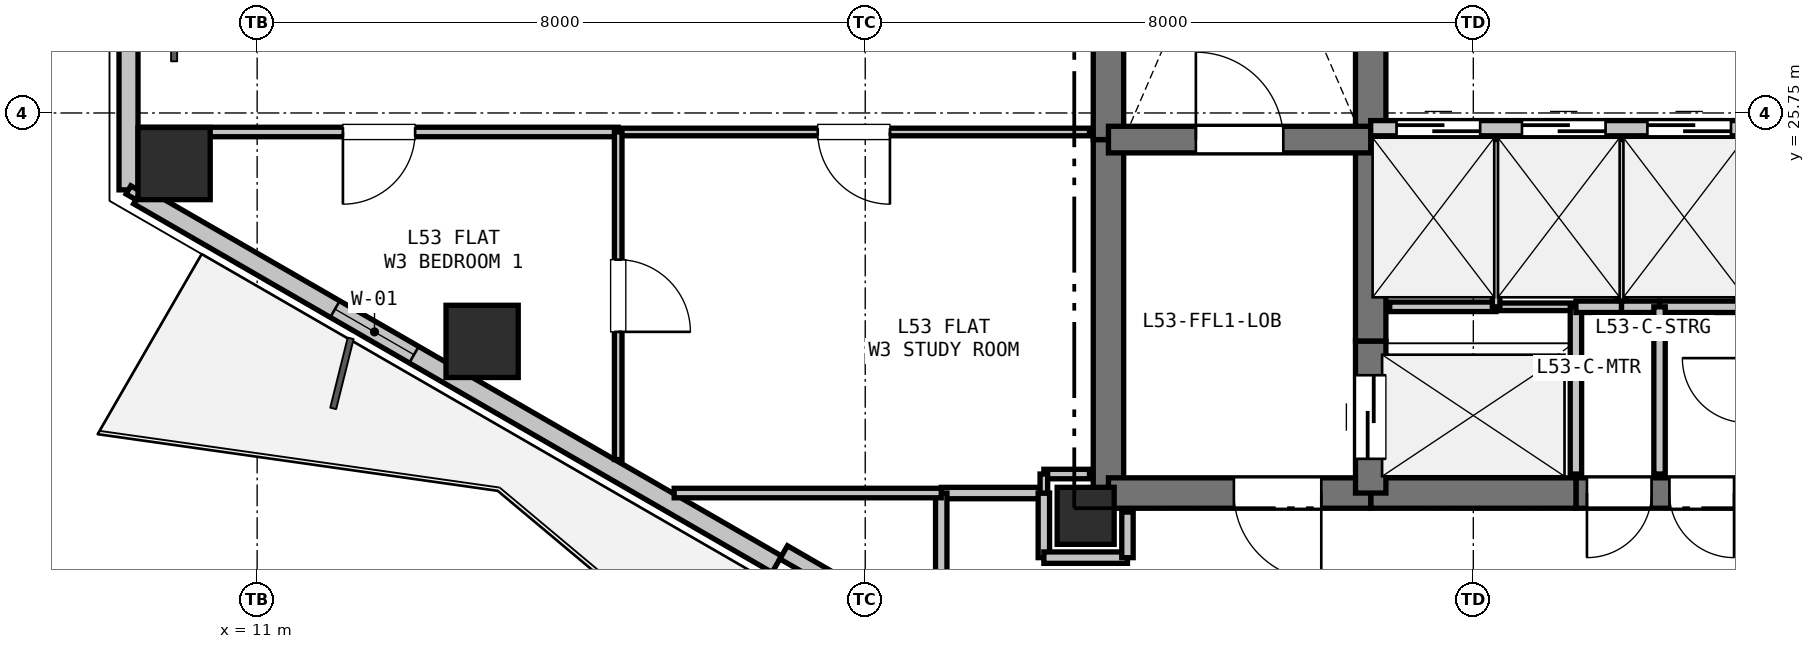
"""IFC4 building model, lengths in metres.
Left out: names, types, materials, properties, quantities, classifications, styles, units other than length and angle.
Written with IfcOpenShell. Run it as: python <this file> out.ifc"""

import sys

from ifc_helpers import new_model, si_unit, direction, frame, frame_2d, origin, origin_2d, place, context, subcontext, project, spatial, rectangle, hollow_rectangle, extrude, element, fill, save


model = new_model("IFC4")
c1 = context("Model", 3, precision=1e-05, world=origin(), true_north=direction((0.0, 1.0)))
c2 = subcontext(c1, "Body", "Model", "MODEL_VIEW")
j1 = project(units=[si_unit("LENGTHUNIT", "METRE"), si_unit("PLANEANGLEUNIT", "RADIAN")], contexts=[c1])
p1 = place(None, origin())
s1 = spatial("IfcSite", under=j1, at=p1, CompositionType="ELEMENT")
p2 = place(p1, origin())
s2 = spatial("IfcBuilding", under=s1, at=p2, CompositionType="ELEMENT")
p3 = place(p2, frame((0.0, 0.0, 192.0)))
s3 = spatial("IfcBuildingStorey", under=s2, at=p3, CompositionType="ELEMENT", Elevation=192.0)
p4 = place(p3, frame((21.9, 20.45, 0.0), z_axis=(0.0, 0.0, 1.0), x_axis=(1.0, 0.0, 0.0)))
e1 = element("IfcColumn", 1, at=p4, inside=s3, PredefinedType="COLUMN", context=c2, shape_type="SweptSolid", body=[
    extrude(rectangle(XDim=0.75, YDim=0.75, at=origin_2d()), origin(), (0.0, 0.0, 1.0), 3.3),
])
for number, where, z_axis, x_axis in (
    (2, (13.96, 22.745, 0.0), (0.0, 0.0, 1.0), (1.0, 0.0, 0.0)),
    (3, (9.907, 25.085, 0.0), (0.0, 0.0, 1.0), (1.0, 0.0, 0.0)),
):
    element("IfcColumn", number, at=place(p3, frame(where, z_axis=z_axis, x_axis=x_axis)), inside=s3, PredefinedType="COLUMN", context=c2, shape_type="SweptSolid", body=[
        extrude(hollow_rectangle(XDim=0.95, YDim=0.95, WallThickness=0.028, at=origin_2d()), origin(), (0.0, 0.0, 1.0), 3.3),
    ])
p5 = place(p3, frame((9.308, 24.738, 0.0), z_axis=(0.0, 0.0, 1.0), x_axis=(0.0, 1.0, 0.0)))
e4 = element("IfcWall", 4, at=p5, inside=s3, PredefinedType="SOLIDWALL", context=c2, shape_type="SweptSolid", body=[
    extrude(rectangle(XDim=4.023, YDim=0.25, at=frame_2d((2.012, 0.0))), origin(), (0.0, 0.0, 1.0), 2.69),
])
p6 = place(p3, frame((17.837, 19.814, 0.0), z_axis=(0.0, 0.0, 1.0), x_axis=(-0.866027133173, 0.499997004599, 0.0)))
e5 = element("IfcWall", 5, at=p6, inside=s3, PredefinedType="SOLIDWALL", context=c2, shape_type="SweptSolid", body=[
    extrude(rectangle(XDim=9.699, YDim=0.25, at=frame_2d((4.849, 0.0))), origin(), (0.0, 0.0, 1.0), 2.69),
])
p7 = place(p6, frame((5.512, 0.0, 0.9)))
e6 = element("IfcOpeningElement", 6, at=p7, cuts=e5, PredefinedType="OPENING", context=c2, shape_type="SweptSolid", body=[
    extrude(rectangle(XDim=1.2, YDim=1.4, at=frame_2d((0.6, 0.7))), frame((0.0, 0.135, 0.0), z_axis=(0.0, -1.0, 0.0), x_axis=(1.0, 0.0, 0.0)), (0.0, 0.0, 1.0), 0.27),
])
p8 = place(p3, frame((19.399, 19.12, 0.0), z_axis=(0.0, 0.0, 1.0), x_axis=(-0.86605165483, 0.499954529098, 0.0)))
e7 = element("IfcWall", 7, at=p8, inside=s3, PredefinedType="PARAPET", context=c2, shape_type="SweptSolid", body=[
    extrude(rectangle(XDim=1.7, YDim=0.2, at=frame_2d((0.85, 0.0))), origin(), (0.0, 0.0, 1.0), 2.69),
])
p9 = place(p3, frame((22.2, 20.75, 0.0), z_axis=(0.0, 0.0, 1.0), x_axis=(0.0, 1.0, 0.0)))
e8 = element("IfcWall", 8, at=p9, inside=s3, PredefinedType="SHEAR", context=c2, shape_type="SweptSolid", body=[
    extrude(rectangle(XDim=4.65, YDim=0.4, at=frame_2d((2.325, 0.0))), origin(), (0.0, 0.0, 1.0), 3.07),
])
p10 = place(p3, frame((22.2, 25.4, 0.0), z_axis=(0.0, 0.0, 1.0), x_axis=(0.0, 1.0, 0.0)))
e9 = element("IfcWall", 9, at=p10, inside=s3, PredefinedType="SHEAR", context=c2, shape_type="SweptSolid", body=[
    extrude(rectangle(XDim=7.35, YDim=0.4, at=frame_2d((3.675, 0.0))), origin(), (0.0, 0.0, 1.0), 3.07),
])
p11 = place(p3, frame((30.6, 20.75, 0.0), z_axis=(0.0, 0.0, 1.0), x_axis=(-1.0, 0.0, 0.0)))
e10 = element("IfcWall", 10, at=p11, inside=s3, PredefinedType="SHEAR", context=c2, shape_type="SweptSolid", body=[
    extrude(rectangle(XDim=2.25, YDim=0.4, at=frame_2d((1.125, 0.0))), origin(), (0.0, 0.0, 1.0), 3.07),
])
p12 = place(p11, frame((1.255, 0.0, 0.0)))
e11 = element("IfcOpeningElement", 11, at=p12, cuts=e10, PredefinedType="OPENING", context=c2, shape_type="SweptSolid", body=[
    extrude(rectangle(XDim=0.85, YDim=2.1, at=frame_2d((0.425, 1.05))), frame((0.0, 0.21, 0.0), z_axis=(0.0, -1.0, 0.0), x_axis=(1.0, 0.0, 0.0)), (0.0, 0.0, 1.0), 0.42),
])
p13 = place(p11, frame((0.17, 0.0, 0.0)))
e12 = element("IfcOpeningElement", 12, at=p13, cuts=e10, PredefinedType="OPENING", context=c2, shape_type="SweptSolid", body=[
    extrude(rectangle(XDim=0.85, YDim=2.1, at=frame_2d((0.425, 1.05))), frame((0.0, 0.21, 0.0), z_axis=(0.0, -1.0, 0.0), x_axis=(1.0, 0.0, 0.0)), (0.0, 0.0, 1.0), 0.42),
])
p14 = place(p3, frame((28.35, 20.75, 0.0), z_axis=(0.0, 0.0, 1.0), x_axis=(-1.0, 0.0, 0.0)))
e13 = element("IfcWall", 13, at=p14, inside=s3, PredefinedType="SHEAR", context=c2, shape_type="SweptSolid", body=[
    extrude(rectangle(XDim=2.7, YDim=0.4, at=frame_2d((1.35, 0.0))), origin(), (0.0, 0.0, 1.0), 3.07),
])
p15 = place(p3, frame((25.65, 20.75, 0.0), z_axis=(0.0, 0.0, 1.0), x_axis=(-1.0, 0.0, 0.0)))
e14 = element("IfcWall", 14, at=p15, inside=s3, PredefinedType="SHEAR", context=c2, shape_type="SweptSolid", body=[
    extrude(rectangle(XDim=3.45, YDim=0.4, at=frame_2d((1.725, 0.0))), origin(), (0.0, 0.0, 1.0), 3.07),
])
p16 = place(p15, frame((0.65, 0.0, 0.0)))
e15 = element("IfcOpeningElement", 15, at=p16, cuts=e14, PredefinedType="OPENING", context=c2, shape_type="SweptSolid", body=[
    extrude(rectangle(XDim=1.15, YDim=2.15, at=frame_2d((0.575, 1.075))), frame((0.0, 0.21, 0.0), z_axis=(0.0, -1.0, 0.0), x_axis=(1.0, 0.0, 0.0)), (0.0, 0.0, 1.0), 0.42),
])
p17 = place(p3, frame((25.65, 20.75, 0.0), z_axis=(0.0, 0.0, 1.0), x_axis=(0.0, 1.0, 0.0)))
e16 = element("IfcWall", 16, at=p17, inside=s3, PredefinedType="SHEAR", context=c2, shape_type="SweptSolid", body=[
    extrude(rectangle(XDim=2.0, YDim=0.4, at=frame_2d((1.0, 0.0))), origin(), (0.0, 0.0, 1.0), 3.07),
])
p18 = place(p17, frame((0.45, 0.0, 0.0)))
e17 = element("IfcOpeningElement", 17, at=p18, cuts=e16, PredefinedType="OPENING", context=c2, shape_type="SweptSolid", body=[
    extrude(rectangle(XDim=1.1, YDim=2.15, at=frame_2d((0.55, 1.075))), frame((0.0, 0.21, 0.0), z_axis=(0.0, -1.0, 0.0), x_axis=(1.0, 0.0, 0.0)), (0.0, 0.0, 1.0), 0.42),
])
p19 = place(p3, frame((25.65, 22.75, 0.0), z_axis=(0.0, 0.0, 1.0), x_axis=(0.0, 1.0, 0.0)))
e18 = element("IfcWall", 18, at=p19, inside=s3, PredefinedType="SHEAR", context=c2, shape_type="SweptSolid", body=[
    extrude(rectangle(XDim=2.8, YDim=0.4, at=frame_2d((1.4, 0.0))), origin(), (0.0, 0.0, 1.0), 3.07),
])
p20 = place(p3, frame((25.65, 25.55, 0.0), z_axis=(0.0, 0.0, 1.0), x_axis=(0.0, 1.0, 0.0)))
e19 = element("IfcWall", 19, at=p20, inside=s3, PredefinedType="SHEAR", context=c2, shape_type="SweptSolid", body=[
    extrude(rectangle(XDim=2.4, YDim=0.4, at=frame_2d((1.2, 0.0))), origin(), (0.0, 0.0, 1.0), 3.07),
])
p21 = place(p3, frame((22.2, 25.4, 0.0), z_axis=(0.0, 0.0, 1.0), x_axis=(1.0, 0.0, 0.0)))
e20 = element("IfcWall", 20, at=p21, inside=s3, PredefinedType="SHEAR", context=c2, shape_type="SweptSolid", body=[
    extrude(rectangle(XDim=3.45, YDim=0.35, at=frame_2d((1.725, 0.0))), origin(), (0.0, 0.0, 1.0), 3.07),
])
p22 = place(p21, frame((1.15, 0.0, 0.0)))
e21 = element("IfcOpeningElement", 21, at=p22, cuts=e20, PredefinedType="OPENING", context=c2, shape_type="SweptSolid", body=[
    extrude(rectangle(XDim=1.15, YDim=2.15, at=frame_2d((0.575, 1.075))), frame((0.0, 0.185, 0.0), z_axis=(0.0, -1.0, 0.0), x_axis=(1.0, 0.0, 0.0)), (0.0, 0.0, 1.0), 0.37),
])
p23 = place(p3, frame((25.65, 25.55, 0.0), z_axis=(0.0, 0.0, 1.0), x_axis=(1.0, 0.0, 0.0)))
e22 = element("IfcWall", 22, at=p23, inside=s3, PredefinedType="PARTITIONING", context=c2, shape_type="SweptSolid", body=[
    extrude(rectangle(XDim=4.95, YDim=0.2, at=frame_2d((2.475, 0.0))), origin(), (0.0, 0.0, 1.0), 3.07),
])
p24 = place(p23, frame((0.34, 0.0, 0.0)))
e23 = element("IfcOpeningElement", 23, at=p24, cuts=e22, PredefinedType="OPENING", context=c2, shape_type="SweptSolid", body=[
    extrude(rectangle(XDim=1.1, YDim=2.15, at=frame_2d((0.55, 1.075))), frame((0.0, 0.11, 0.0), z_axis=(0.0, -1.0, 0.0), x_axis=(1.0, 0.0, 0.0)), (0.0, 0.0, 1.0), 0.22),
])
p25 = place(p23, frame((1.99, 0.0, 0.0)))
e24 = element("IfcOpeningElement", 24, at=p25, cuts=e22, PredefinedType="OPENING", context=c2, shape_type="SweptSolid", body=[
    extrude(rectangle(XDim=1.1, YDim=2.15, at=frame_2d((0.55, 1.075))), frame((0.0, 0.11, 0.0), z_axis=(0.0, -1.0, 0.0), x_axis=(1.0, 0.0, 0.0)), (0.0, 0.0, 1.0), 0.22),
])
p26 = place(p23, frame((3.64, 0.0, 0.0)))
e25 = element("IfcOpeningElement", 25, at=p26, cuts=e22, PredefinedType="OPENING", context=c2, shape_type="SweptSolid", body=[
    extrude(rectangle(XDim=1.1, YDim=2.15, at=frame_2d((0.55, 1.075))), frame((0.0, 0.11, 0.0), z_axis=(0.0, -1.0, 0.0), x_axis=(1.0, 0.0, 0.0)), (0.0, 0.0, 1.0), 0.22),
])
p27 = place(p3, frame((25.9, 23.2, 0.0), z_axis=(0.0, 0.0, 1.0), x_axis=(1.0, 0.0, 0.0)))
e26 = element("IfcWall", 26, at=p27, inside=s3, PredefinedType="PARTITIONING", context=c2, shape_type="SweptSolid", body=[
    extrude(rectangle(XDim=1.4, YDim=0.125, at=frame_2d((0.7, 0.0))), origin(), (0.0, 0.0, 1.0), 3.07),
])
p28 = place(p3, frame((27.3, 23.2, 0.0), z_axis=(0.0, 0.0, 1.0), x_axis=(1.0, 0.0, 0.0)))
e27 = element("IfcWall", 27, at=p28, inside=s3, PredefinedType="PARTITIONING", context=c2, shape_type="SweptSolid", body=[
    extrude(rectangle(XDim=1.05, YDim=0.1, at=frame_2d((0.525, 0.0))), origin(), (0.0, 0.0, 1.0), 3.07),
])
p29 = place(p3, frame((28.35, 23.2, 0.0), z_axis=(0.0, 0.0, 1.0), x_axis=(0.0, -1.0, 0.0)))
e28 = element("IfcWall", 28, at=p29, inside=s3, PredefinedType="PARTITIONING", context=c2, shape_type="SweptSolid", body=[
    extrude(rectangle(XDim=2.2, YDim=0.15, at=frame_2d((1.1, 0.0))), origin(), (0.0, 0.0, 1.0), 3.07),
])
p30 = place(p3, frame((27.3, 25.4, 0.0), z_axis=(0.0, 0.0, 1.0), x_axis=(0.0, -1.0, 0.0)))
e29 = element("IfcWall", 29, at=p30, inside=s3, PredefinedType="PARTITIONING", context=c2, shape_type="SweptSolid", body=[
    extrude(rectangle(XDim=2.2, YDim=0.1, at=frame_2d((1.1, 0.0))), origin(), (0.0, 0.0, 1.0), 3.07),
])
p31 = place(p3, frame((28.95, 25.4, 0.0), z_axis=(0.0, 0.0, 1.0), x_axis=(0.0, -1.0, 0.0)))
e30 = element("IfcWall", 30, at=p31, inside=s3, PredefinedType="PARTITIONING", context=c2, shape_type="SweptSolid", body=[
    extrude(rectangle(XDim=2.2, YDim=0.125, at=frame_2d((1.1, 0.0))), origin(), (0.0, 0.0, 1.0), 3.07),
])
p32 = place(p3, frame((28.95, 23.2, 0.0), z_axis=(0.0, 0.0, 1.0), x_axis=(-1.0, 0.0, 0.0)))
e31 = element("IfcWall", 31, at=p32, inside=s3, PredefinedType="PARTITIONING", context=c2, shape_type="SweptSolid", body=[
    extrude(rectangle(XDim=0.6, YDim=0.15, at=frame_2d((0.3, 0.0))), origin(), (0.0, 0.0, 1.0), 3.07),
])
p33 = place(p3, frame((30.6, 23.2, 0.0), z_axis=(0.0, 0.0, 1.0), x_axis=(-1.0, 0.0, 0.0)))
e32 = element("IfcWall", 32, at=p33, inside=s3, PredefinedType="PARTITIONING", context=c2, shape_type="SweptSolid", body=[
    extrude(rectangle(XDim=1.15, YDim=0.15, at=frame_2d((0.575, 0.0))), origin(), (0.0, 0.0, 1.0), 3.07),
])
p34 = place(p3, frame((29.45, 23.2, 0.0), z_axis=(0.0, 0.0, 1.0), x_axis=(-1.0, 0.0, 0.0)))
e33 = element("IfcWall", 33, at=p34, inside=s3, PredefinedType="PARTITIONING", context=c2, shape_type="SweptSolid", body=[
    extrude(rectangle(XDim=0.5, YDim=0.15, at=frame_2d((0.25, 0.0))), origin(), (0.0, 0.0, 1.0), 3.07),
])
p35 = place(p3, frame((20.0, 20.75, 0.0), z_axis=(0.0, 0.0, 1.0), x_axis=(1.0, 0.0, 0.0)))
e34 = element("IfcWall", 34, at=p35, inside=s3, PredefinedType="PARTITIONING", context=c2, shape_type="SweptSolid", body=[
    extrude(rectangle(XDim=1.35, YDim=0.15, at=frame_2d((0.675, 0.0))), origin(), (0.0, 0.0, 1.0), 2.518),
])
p36 = place(p3, frame((21.35, 20.75, 0.0), z_axis=(0.0, 0.0, 1.0), x_axis=(0.0, -1.0, 0.0)))
e35 = element("IfcWall", 35, at=p36, inside=s3, PredefinedType="PARTITIONING", context=c2, shape_type="SweptSolid", body=[
    extrude(rectangle(XDim=0.85, YDim=0.15, at=frame_2d((0.425, 0.0))), origin(), (0.0, 0.0, 1.0), 2.518),
])
p37 = place(p3, frame((21.35, 19.9, 0.0), z_axis=(0.0, 0.0, 1.0), x_axis=(1.0, 0.0, 0.0)))
e36 = element("IfcWall", 36, at=p37, inside=s3, PredefinedType="PARTITIONING", context=c2, shape_type="SweptSolid", body=[
    extrude(rectangle(XDim=1.1, YDim=0.15, at=frame_2d((0.55, 0.0))), origin(), (0.0, 0.0, 1.0), 2.518),
])
p38 = place(p3, frame((22.45, 19.9, 0.0), z_axis=(0.0, 0.0, 1.0), x_axis=(0.0, 1.0, 0.0)))
e37 = element("IfcWall", 37, at=p38, inside=s3, PredefinedType="PARTITIONING", context=c2, shape_type="SweptSolid", body=[
    extrude(rectangle(XDim=0.6, YDim=0.15, at=frame_2d((0.3, 0.0))), origin(), (0.0, 0.0, 1.0), 2.518),
])
p39 = place(p3, frame((20.0, 18.609, 0.0), z_axis=(0.0, 0.0, 1.0), x_axis=(0.0, 1.0, 0.0)))
e38 = element("IfcWall", 38, at=p39, inside=s3, PredefinedType="PARTITIONING", context=c2, shape_type="SweptSolid", body=[
    extrude(rectangle(XDim=2.141, YDim=0.15, at=frame_2d((1.071, 0.0))), origin(), (0.0, 0.0, 1.0), 2.365),
])
p40 = place(p3, frame((29.45, 23.2, 0.0), z_axis=(0.0, 0.0, 1.0), x_axis=(0.0, -1.0, 0.0)))
e39 = element("IfcWall", 39, at=p40, inside=s3, PredefinedType="PARTITIONING", context=c2, shape_type="SweptSolid", body=[
    extrude(rectangle(XDim=2.2, YDim=0.15, at=frame_2d((1.1, 0.0))), origin(), (0.0, 0.0, 1.0), 3.07),
])
p41 = place(p3, frame((21.95, 25.5, 0.0), z_axis=(0.0, 0.0, 1.0), x_axis=(-1.0, 0.0, 0.0)))
e40 = element("IfcWall", 40, at=p41, inside=s3, PredefinedType="PARTITIONING", context=c2, shape_type="SweptSolid", body=[
    extrude(rectangle(XDim=6.2, YDim=0.1, at=frame_2d((3.1, 0.0))), origin(), (0.0, 0.0, 1.0), 2.595),
])
p42 = place(p41, frame((2.625, 0.0, 0.0)))
e41 = element("IfcOpeningElement", 41, at=p42, cuts=e40, PredefinedType="OPENING", context=c2, shape_type="SweptSolid", body=[
    extrude(rectangle(XDim=0.95, YDim=2.1, at=frame_2d((0.475, 1.05))), frame((0.0, 0.06, 0.0), z_axis=(0.0, -1.0, 0.0), x_axis=(1.0, 0.0, 0.0)), (0.0, 0.0, 1.0), 0.12),
])
p43 = place(p3, frame((15.75, 25.5, 0.0), z_axis=(0.0, 0.0, 1.0), x_axis=(-1.0, 0.0, 0.0)))
e42 = element("IfcWall", 42, at=p43, inside=s3, PredefinedType="PARTITIONING", context=c2, shape_type="SweptSolid", body=[
    extrude(rectangle(XDim=6.293, YDim=0.125, at=frame_2d((3.147, 0.0))), origin(), (0.0, 0.0, 1.0), 2.795),
])
p44 = place(p43, frame((2.672, 0.0, 0.0)))
e43 = element("IfcOpeningElement", 43, at=p44, cuts=e42, PredefinedType="OPENING", context=c2, shape_type="SweptSolid", body=[
    extrude(rectangle(XDim=0.95, YDim=2.1, at=frame_2d((0.475, 1.05))), frame((0.0, 0.073, 0.0), z_axis=(0.0, -1.0, 0.0), x_axis=(1.0, 0.0, 0.0)), (0.0, 0.0, 1.0), 0.145),
])
p45 = place(p3, frame((9.437, 24.663, 0.0), z_axis=(0.0, 0.0, 1.0), x_axis=(-0.866239593359, 0.499628829129, 0.0)))
e44 = element("IfcWall", 44, at=p45, inside=s3, PredefinedType="PARTITIONING", context=c2, shape_type="SweptSolid", body=[
    extrude(rectangle(XDim=0.15, YDim=0.125, at=frame_2d((0.075, 0.0))), origin(), (0.0, 0.0, 1.0), 3.07),
])
p46 = place(p3, frame((15.75, 25.5, 0.0), z_axis=(0.0, 0.0, 1.0), x_axis=(0.0, -1.0, 0.0)))
e45 = element("IfcWall", 45, at=p46, inside=s3, PredefinedType="PARTITIONING", context=c2, shape_type="SweptSolid", body=[
    extrude(rectangle(XDim=4.309, YDim=0.1, at=frame_2d((2.155, 0.0))), origin(), (0.0, 0.0, 1.0), 2.365),
])
p47 = place(p46, frame((1.68, 0.0, 0.0)))
e46 = element("IfcOpeningElement", 46, at=p47, cuts=e45, PredefinedType="OPENING", context=c2, shape_type="SweptSolid", body=[
    extrude(rectangle(XDim=0.95, YDim=2.1, at=frame_2d((0.475, 1.05))), frame((0.0, 0.06, 0.0), z_axis=(0.0, -1.0, 0.0), x_axis=(1.0, 0.0, 0.0)), (0.0, 0.0, 1.0), 0.12),
])
p48 = place(p3, frame((21.95, 21.0, 0.0), z_axis=(0.0, 0.0, 1.0), x_axis=(-1.0, 0.0, 0.0)))
e47 = element("IfcWall", 47, at=p48, inside=s3, PredefinedType="PARTITIONING", context=c2, shape_type="SweptSolid", body=[
    extrude(rectangle(XDim=0.6, YDim=0.125, at=frame_2d((0.3, 0.0))), origin(), (0.0, 0.0, 1.0), 2.595),
])
p49 = place(p3, frame((21.35, 21.0, 0.0), z_axis=(0.0, 0.0, 1.0), x_axis=(0.0, -1.0, 0.0)))
e48 = element("IfcWall", 48, at=p49, inside=s3, PredefinedType="PARTITIONING", context=c2, shape_type="SweptSolid", body=[
    extrude(rectangle(XDim=0.25, YDim=0.1, at=frame_2d((0.125, 0.0))), origin(), (0.0, 0.0, 1.0), 2.518),
])
p50 = place(p3, frame((20.0, 20.75, 0.0), z_axis=(0.0, 0.0, 1.0), x_axis=(-1.0, 0.0, 0.0)))
e49 = element("IfcWall", 49, at=p50, inside=s3, PredefinedType="PARTITIONING", context=c2, shape_type="SweptSolid", body=[
    extrude(rectangle(XDim=3.514, YDim=0.125, at=frame_2d((1.757, 0.0))), origin(), (0.0, 0.0, 1.0), 2.365),
])
p51 = place(p7, origin())
e50 = element("IfcWindow", 50, at=p51, inside=s3, PartitioningType="SINGLE_PANEL", PredefinedType="WINDOW", context=c2, shape_type="SweptSolid", body=[
    extrude(rectangle(XDim=1.2, YDim=1.4, at=frame_2d((0.6, 0.7))), frame((0.0, 0.03, 0.0), z_axis=(0.0, -1.0, 0.0), x_axis=(1.0, 0.0, 0.0)), (0.0, 0.0, 1.0), 0.06),
])
fill(e6, e50)
p52 = place(p24, origin())
e51 = element("IfcDoor", 51, at=p52, inside=s3, OperationType="SLIDING_TO_LEFT", PredefinedType="DOOR", context=c2, shape_type="SweptSolid", body=[
    extrude(rectangle(XDim=1.1, YDim=2.15, at=frame_2d((0.55, 1.075))), frame((0.0, 0.025, 0.0), z_axis=(0.0, -1.0, 0.0), x_axis=(1.0, 0.0, 0.0)), (0.0, 0.0, 1.0), 0.05),
])
fill(e23, e51)
p53 = place(p25, origin())
e52 = element("IfcDoor", 52, at=p53, inside=s3, OperationType="SLIDING_TO_LEFT", PredefinedType="DOOR", context=c2, shape_type="SweptSolid", body=[
    extrude(rectangle(XDim=1.1, YDim=2.15, at=frame_2d((0.55, 1.075))), frame((0.0, 0.025, 0.0), z_axis=(0.0, -1.0, 0.0), x_axis=(1.0, 0.0, 0.0)), (0.0, 0.0, 1.0), 0.05),
])
fill(e24, e52)
p54 = place(p26, origin())
e53 = element("IfcDoor", 53, at=p54, inside=s3, OperationType="SLIDING_TO_LEFT", PredefinedType="DOOR", context=c2, shape_type="SweptSolid", body=[
    extrude(rectangle(XDim=1.1, YDim=2.15, at=frame_2d((0.55, 1.075))), frame((0.0, 0.025, 0.0), z_axis=(0.0, -1.0, 0.0), x_axis=(1.0, 0.0, 0.0)), (0.0, 0.0, 1.0), 0.05),
])
fill(e25, e53)
p55 = place(p18, origin())
e54 = element("IfcDoor", 54, at=p55, inside=s3, OperationType="SLIDING_TO_LEFT", PredefinedType="DOOR", context=c2, shape_type="SweptSolid", body=[
    extrude(rectangle(XDim=1.1, YDim=2.15, at=frame_2d((0.55, 1.075))), frame((0.0, 0.025, 0.0), z_axis=(0.0, -1.0, 0.0), x_axis=(1.0, 0.0, 0.0)), (0.0, 0.0, 1.0), 0.05),
])
fill(e17, e54)
p56 = place(p22, origin())
e55 = element("IfcDoor", 55, at=p56, inside=s3, OperationType="SINGLE_SWING_LEFT", PredefinedType="DOOR", context=c2, shape_type="SweptSolid", body=[
    extrude(rectangle(XDim=1.15, YDim=2.15, at=frame_2d((0.575, 1.075))), frame((0.0, 0.025, 0.0), z_axis=(0.0, -1.0, 0.0), x_axis=(1.0, 0.0, 0.0)), (0.0, 0.0, 1.0), 0.05),
])
fill(e21, e55)
p57 = place(p16, origin())
e56 = element("IfcDoor", 56, at=p57, inside=s3, OperationType="SINGLE_SWING_LEFT", PredefinedType="DOOR", context=c2, shape_type="SweptSolid", body=[
    extrude(rectangle(XDim=1.15, YDim=2.15, at=frame_2d((0.575, 1.075))), frame((0.0, 0.025, 0.0), z_axis=(0.0, -1.0, 0.0), x_axis=(1.0, 0.0, 0.0)), (0.0, 0.0, 1.0), 0.05),
])
fill(e15, e56)
p58 = place(p12, origin())
e57 = element("IfcDoor", 57, at=p58, inside=s3, OperationType="SINGLE_SWING_RIGHT", PredefinedType="DOOR", context=c2, shape_type="SweptSolid", body=[
    extrude(rectangle(XDim=0.85, YDim=2.1, at=frame_2d((0.425, 1.05))), frame((0.0, 0.025, 0.0), z_axis=(0.0, -1.0, 0.0), x_axis=(1.0, 0.0, 0.0)), (0.0, 0.0, 1.0), 0.05),
])
fill(e11, e57)
p59 = place(p13, origin())
e58 = element("IfcDoor", 58, at=p59, inside=s3, OperationType="SINGLE_SWING_LEFT", PredefinedType="DOOR", context=c2, shape_type="SweptSolid", body=[
    extrude(rectangle(XDim=0.85, YDim=2.1, at=frame_2d((0.425, 1.05))), frame((0.0, 0.025, 0.0), z_axis=(0.0, -1.0, 0.0), x_axis=(1.0, 0.0, 0.0)), (0.0, 0.0, 1.0), 0.05),
])
fill(e12, e58)
p60 = place(p44, origin())
e59 = element("IfcDoor", 59, at=p60, inside=s3, OperationType="SINGLE_SWING_RIGHT", PredefinedType="DOOR", context=c2, shape_type="SweptSolid", body=[
    extrude(rectangle(XDim=0.95, YDim=2.1, at=frame_2d((0.475, 1.05))), frame((0.0, 0.025, 0.0), z_axis=(0.0, -1.0, 0.0), x_axis=(1.0, 0.0, 0.0)), (0.0, 0.0, 1.0), 0.05),
])
fill(e43, e59)
p61 = place(p42, origin())
e60 = element("IfcDoor", 60, at=p61, inside=s3, OperationType="SINGLE_SWING_LEFT", PredefinedType="DOOR", context=c2, shape_type="SweptSolid", body=[
    extrude(rectangle(XDim=0.95, YDim=2.1, at=frame_2d((0.475, 1.05))), frame((0.0, 0.025, 0.0), z_axis=(0.0, -1.0, 0.0), x_axis=(1.0, 0.0, 0.0)), (0.0, 0.0, 1.0), 0.05),
])
fill(e41, e60)
p62 = place(p47, origin())
e61 = element("IfcDoor", 61, at=p62, inside=s3, OperationType="SINGLE_SWING_RIGHT", PredefinedType="DOOR", context=c2, shape_type="SweptSolid", body=[
    extrude(rectangle(XDim=0.95, YDim=2.1, at=frame_2d((0.475, 1.05))), frame((0.0, 0.025, 0.0), z_axis=(0.0, -1.0, 0.0), x_axis=(1.0, 0.0, 0.0)), (0.0, 0.0, 1.0), 0.05),
])
fill(e46, e61)
save(model, sys.argv[1])
